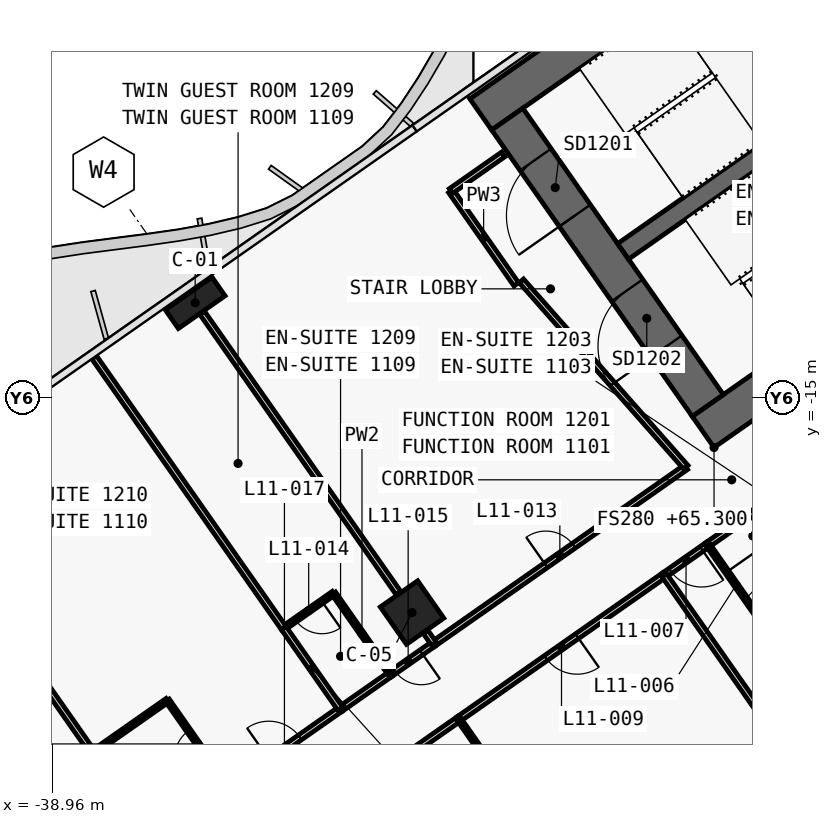
"""IFC4 building model, lengths in metres.
Left out: names, types, materials, properties, quantities, classifications, styles, units other than length and angle.
Written with IfcOpenShell. Run it as: python <this file> out.ifc"""

import sys

from ifc_helpers import new_model, si_unit, direction, frame, frame_2d, origin, origin_2d, place, context, subcontext, project, spatial, polyline, rectangle, outline, extrude, element, fill, save


model = new_model("IFC4")
c1 = context("Model", 3, precision=1e-05, world=origin(), true_north=direction((0.0, 1.0)))
c2 = subcontext(c1, "Body", "Model", "MODEL_VIEW")
j1 = project(units=[si_unit("LENGTHUNIT", "METRE"), si_unit("PLANEANGLEUNIT", "RADIAN")], contexts=[c1])
p1 = place(None, origin())
s1 = spatial("IfcSite", under=j1, at=p1, CompositionType="ELEMENT")
p2 = place(p1, origin())
s2 = spatial("IfcBuilding", under=s1, at=p2, CompositionType="ELEMENT")
p3 = place(p2, frame((0.0, 0.0, 65.3)))
s3 = spatial("IfcBuildingStorey", under=s2, at=p3, CompositionType="ELEMENT", Elevation=65.3)
p4 = place(p3, frame((0.037, 11.867, 0.0), z_axis=(0.0, 0.0, 1.0), x_axis=(-0.819155306259, -0.573571777746, 0.0)))
e1 = element("IfcWall", 1, at=p4, inside=s3, PredefinedType="SHEAR", context=c2, shape_type="SweptSolid", body=[
    extrude(outline(polyline([(33.837, 0.5), (0.7, 0.5), (0.0, -0.5), (33.837, -0.5), (33.837, 0.5)])), origin(), (0.0, 0.0, 1.0), 3.6),
])
p5 = place(p3, frame((0.037, -0.585, 0.0), z_axis=(0.0, 0.0, 1.0), x_axis=(-0.819157152511, -0.573569140985, 0.0)))
e2 = element("IfcWall", 2, at=p5, inside=s3, PredefinedType="SHEAR", context=c2, shape_type="SweptSolid", body=[
    extrude(outline(polyline([(26.695, 0.5), (0.7, 0.5), (0.0, -0.5), (26.695, -0.5), (26.695, 0.5)])), origin(), (0.0, 0.0, 1.0), 3.6),
])
p6 = place(p5, frame((2.995, 0.0, 0.0)))
e3 = element("IfcOpeningElement", 3, at=p6, cuts=e2, PredefinedType="OPENING", context=c2, shape_type="SweptSolid", body=[
    extrude(rectangle(XDim=2.4, YDim=2.1, at=frame_2d((1.2, 1.05))), frame((0.0, 0.51, 0.0), z_axis=(0.0, -1.0, 0.0), x_axis=(1.0, 0.0, 0.0)), (0.0, 0.0, 1.0), 1.02),
])
p7 = place(p5, frame((11.995, 0.0, 0.0)))
e4 = element("IfcOpeningElement", 4, at=p7, cuts=e2, PredefinedType="OPENING", context=c2, shape_type="SweptSolid", body=[
    extrude(rectangle(XDim=2.4, YDim=2.1, at=frame_2d((1.2, 1.05))), frame((0.0, 0.51, 0.0), z_axis=(0.0, -1.0, 0.0), x_axis=(1.0, 0.0, 0.0)), (0.0, 0.0, 1.0), 1.02),
])
p8 = place(p3, frame((-21.708, -15.2, 0.0), z_axis=(0.0, 0.0, 1.0), x_axis=(-0.573576324356, 0.819152122709, 0.0)))
e5 = element("IfcWall", 5, at=p8, inside=s3, PredefinedType="SHEAR", context=c2, shape_type="SweptSolid", body=[
    extrude(outline(polyline([(0.0, 0.5), (0.0, -0.5), (9.2, -0.5), (9.2, 0.5), (0.0, 0.5)])), origin(), (0.0, 0.0, 1.0), 3.6),
])
p9 = place(p8, frame((6.1, 0.0, 0.0)))
e6 = element("IfcOpeningElement", 6, at=p9, cuts=e5, PredefinedType="OPENING", context=c2, shape_type="SweptSolid", body=[
    extrude(rectangle(XDim=1.8, YDim=2.1, at=frame_2d((0.9, 1.05))), frame((0.0, 0.51, 0.0), z_axis=(0.0, -1.0, 0.0), x_axis=(1.0, 0.0, 0.0)), (0.0, 0.0, 1.0), 1.02),
])
p10 = place(p8, frame((1.9, 0.0, 0.0)))
e7 = element("IfcOpeningElement", 7, at=p10, cuts=e5, PredefinedType="OPENING", context=c2, shape_type="SweptSolid", body=[
    extrude(rectangle(XDim=1.8, YDim=2.1, at=frame_2d((0.9, 1.05))), frame((0.0, 0.51, 0.0), z_axis=(0.0, -1.0, 0.0), x_axis=(1.0, 0.0, 0.0)), (0.0, 0.0, 1.0), 1.02),
])
p11 = place(p3, frame((-2.638, 3.768, 0.0), z_axis=(0.0, 0.0, 1.0), x_axis=(-0.819148977158, -0.573580816643, 0.0)))
e8 = element("IfcWall", 8, at=p11, inside=s3, PredefinedType="SHEAR", context=c2, shape_type="SweptSolid", body=[
    extrude(outline(polyline([(26.0, 0.25), (0.0, 0.25), (0.0, -0.25), (26.0, -0.25), (26.0, 0.25)])), origin(), (0.0, 0.0, 1.0), 3.6),
])
p12 = place(p11, frame((1.169, 0.0, 0.0)))
e9 = element("IfcOpeningElement", 9, at=p12, cuts=e8, PredefinedType="OPENING", context=c2, shape_type="SweptSolid", body=[
    extrude(rectangle(XDim=1.1, YDim=2.1, at=frame_2d((0.55, 1.05))), frame((0.0, 0.26, 0.0), z_axis=(0.0, -1.0, 0.0), x_axis=(1.0, 0.0, 0.0)), (0.0, 0.0, 1.0), 0.52),
])
p13 = place(p11, frame((3.206, 0.0, 0.0)))
e10 = element("IfcOpeningElement", 10, at=p13, cuts=e8, PredefinedType="OPENING", context=c2, shape_type="SweptSolid", body=[
    extrude(rectangle(XDim=1.1, YDim=2.1, at=frame_2d((0.55, 1.05))), frame((0.0, 0.26, 0.0), z_axis=(0.0, -1.0, 0.0), x_axis=(1.0, 0.0, 0.0)), (0.0, 0.0, 1.0), 0.52),
])
p14 = place(p11, frame((5.244, 0.0, 0.0)))
e11 = element("IfcOpeningElement", 11, at=p14, cuts=e8, PredefinedType="OPENING", context=c2, shape_type="SweptSolid", body=[
    extrude(rectangle(XDim=1.1, YDim=2.1, at=frame_2d((0.55, 1.05))), frame((0.0, 0.26, 0.0), z_axis=(0.0, -1.0, 0.0), x_axis=(1.0, 0.0, 0.0)), (0.0, 0.0, 1.0), 0.52),
])
p15 = place(p11, frame((7.281, 0.0, 0.0)))
e12 = element("IfcOpeningElement", 12, at=p15, cuts=e8, PredefinedType="OPENING", context=c2, shape_type="SweptSolid", body=[
    extrude(rectangle(XDim=1.1, YDim=2.1, at=frame_2d((0.55, 1.05))), frame((0.0, 0.26, 0.0), z_axis=(0.0, -1.0, 0.0), x_axis=(1.0, 0.0, 0.0)), (0.0, 0.0, 1.0), 0.52),
])
p16 = place(p11, frame((9.688, 0.0, 0.0)))
e13 = element("IfcOpeningElement", 13, at=p16, cuts=e8, PredefinedType="OPENING", context=c2, shape_type="SweptSolid", body=[
    extrude(rectangle(XDim=1.1, YDim=2.1, at=frame_2d((0.55, 1.05))), frame((0.0, 0.26, 0.0), z_axis=(0.0, -1.0, 0.0), x_axis=(1.0, 0.0, 0.0)), (0.0, 0.0, 1.0), 0.52),
])
p17 = place(p11, frame((11.863, 0.0, 0.0)))
e14 = element("IfcOpeningElement", 14, at=p17, cuts=e8, PredefinedType="OPENING", context=c2, shape_type="SweptSolid", body=[
    extrude(rectangle(XDim=1.1, YDim=2.1, at=frame_2d((0.55, 1.05))), frame((0.0, 0.26, 0.0), z_axis=(0.0, -1.0, 0.0), x_axis=(1.0, 0.0, 0.0)), (0.0, 0.0, 1.0), 0.52),
])
p18 = place(p11, frame((14.038, 0.0, 0.0)))
e15 = element("IfcOpeningElement", 15, at=p18, cuts=e8, PredefinedType="OPENING", context=c2, shape_type="SweptSolid", body=[
    extrude(rectangle(XDim=1.1, YDim=2.1, at=frame_2d((0.55, 1.05))), frame((0.0, 0.26, 0.0), z_axis=(0.0, -1.0, 0.0), x_axis=(1.0, 0.0, 0.0)), (0.0, 0.0, 1.0), 0.52),
])
p19 = place(p11, frame((16.212, 0.0, 0.0)))
e16 = element("IfcOpeningElement", 16, at=p19, cuts=e8, PredefinedType="OPENING", context=c2, shape_type="SweptSolid", body=[
    extrude(rectangle(XDim=1.1, YDim=2.1, at=frame_2d((0.55, 1.05))), frame((0.0, 0.26, 0.0), z_axis=(0.0, -1.0, 0.0), x_axis=(1.0, 0.0, 0.0)), (0.0, 0.0, 1.0), 0.52),
])
p20 = place(p3, frame((-35.197, -12.498, 0.0), z_axis=(0.0, 0.0, 1.0), x_axis=(-0.819152044289, -0.573576436351, 0.0)))
e17 = element("IfcColumn", 17, at=p20, inside=s3, PredefinedType="COLUMN", context=c2, shape_type="SweptSolid", body=[
    extrude(rectangle(XDim=1.5, YDim=0.6, at=origin_2d()), origin(), (0.0, 0.0, 1.0), 3.6),
])
p21 = place(p3, frame((-29.49, -20.649, 0.0), z_axis=(0.0, 0.0, 1.0), x_axis=(-0.819152044289, -0.573576436351, 0.0)))
e18 = element("IfcColumn", 18, at=p21, inside=s3, PredefinedType="COLUMN", context=c2, shape_type="SweptSolid", body=[
    extrude(rectangle(XDim=1.2, YDim=1.2, at=origin_2d()), origin(), (0.0, 0.0, 1.0), 3.6),
])
p22 = place(p3, frame((-28.917, -21.469, 0.0), z_axis=(0.0, 0.0, 1.0), x_axis=(0.819152599934, 0.573575642807, 0.0)))
e19 = element("IfcWall", 19, at=p22, inside=s3, PredefinedType="PARTITIONING", context=c2, shape_type="SweptSolid", body=[
    extrude(rectangle(XDim=8.098, YDim=0.15, at=frame_2d((4.049, 0.0))), origin(), (0.0, 0.0, 1.0), 2.6),
])
p23 = place(p22, frame((3.599, 0.0, 0.0)))
e20 = element("IfcOpeningElement", 20, at=p23, cuts=e19, PredefinedType="OPENING", context=c2, shape_type="SweptSolid", body=[
    extrude(rectangle(XDim=0.9, YDim=2.1, at=frame_2d((0.45, 1.05))), frame((0.0, 0.085, 0.0), z_axis=(0.0, -1.0, 0.0), x_axis=(1.0, 0.0, 0.0)), (0.0, 0.0, 1.0), 0.17),
])
p24 = place(p3, frame((-28.914, -21.467, 0.0), z_axis=(0.0, 0.0, 1.0), x_axis=(-0.81914197737, -0.573590813132, 0.0)))
e21 = element("IfcWall", 21, at=p24, inside=s3, PredefinedType="PARTITIONING", context=c2, shape_type="SweptSolid", body=[
    extrude(rectangle(XDim=1.403, YDim=0.15, at=frame_2d((0.701, 0.0))), origin(), (0.0, 0.0, 1.0), 2.6),
])
p25 = place(p24, frame((0.403, 0.0, 0.0)))
e22 = element("IfcOpeningElement", 22, at=p25, cuts=e21, PredefinedType="OPENING", context=c2, shape_type="SweptSolid", body=[
    extrude(rectangle(XDim=0.85, YDim=2.1, at=frame_2d((0.425, 1.05))), frame((0.0, 0.085, 0.0), z_axis=(0.0, -1.0, 0.0), x_axis=(1.0, 0.0, 0.0)), (0.0, 0.0, 1.0), 0.17),
])
p26 = place(p3, frame((-31.375, -23.19, 0.0), z_axis=(0.0, 0.0, 1.0), x_axis=(0.819189013667, 0.573523634986, 0.0)))
e23 = element("IfcWall", 23, at=p26, inside=s3, PredefinedType="PARTITIONING", context=c2, shape_type="SweptSolid", body=[
    extrude(rectangle(XDim=1.604, YDim=0.15, at=frame_2d((0.802, 0.0))), origin(), (0.0, 0.0, 1.0), 3.32),
])
p27 = place(p3, frame((-34.323, -25.254, 0.0), z_axis=(0.0, 0.0, 1.0), x_axis=(0.819145961204, 0.573585123798, 0.0)))
e24 = element("IfcWall", 24, at=p27, inside=s3, PredefinedType="PARTITIONING", context=c2, shape_type="SweptSolid", body=[
    extrude(rectangle(XDim=3.603, YDim=0.15, at=frame_2d((1.802, 0.0))), origin(), (0.0, 0.0, 1.0), 3.32),
])
p28 = place(p27, frame((1.301, 0.0, 0.0)))
e25 = element("IfcOpeningElement", 25, at=p28, cuts=e24, PredefinedType="OPENING", context=c2, shape_type="SweptSolid", body=[
    extrude(rectangle(XDim=1.0, YDim=2.1, at=frame_2d((0.5, 1.05))), frame((0.0, 0.085, 0.0), z_axis=(0.0, -1.0, 0.0), x_axis=(1.0, 0.0, 0.0)), (0.0, 0.0, 1.0), 0.17),
])
p29 = place(p3, frame((-21.706, -18.861, 0.0), z_axis=(0.0, 0.0, 1.0), x_axis=(-0.819060210533, -0.573707566205, 0.0)))
e26 = element("IfcWall", 26, at=p29, inside=s3, PredefinedType="PARTITIONING", context=c2, shape_type="SweptSolid", body=[
    extrude(rectangle(XDim=1.403, YDim=0.15, at=frame_2d((0.702, 0.0))), origin(), (0.0, 0.0, 1.0), 3.32),
])
p30 = place(p29, frame((0.201, 0.0, 0.0)))
e27 = element("IfcOpeningElement", 27, at=p30, cuts=e26, PredefinedType="OPENING", context=c2, shape_type="SweptSolid", body=[
    extrude(rectangle(XDim=1.0, YDim=2.1, at=frame_2d((0.5, 1.05))), frame((0.0, 0.085, 0.0), z_axis=(0.0, -1.0, 0.0), x_axis=(1.0, 0.0, 0.0)), (0.0, 0.0, 1.0), 0.17),
])
p31 = place(p3, frame((-20.395, -17.943, 0.0), z_axis=(0.0, 0.0, 1.0), x_axis=(-0.819189013667, -0.573523634986, 0.0)))
e28 = element("IfcWall", 28, at=p31, inside=s3, PredefinedType="PARTITIONING", context=c2, shape_type="SweptSolid", body=[
    extrude(rectangle(XDim=1.604, YDim=0.15, at=frame_2d((0.802, 0.0))), origin(), (0.0, 0.0, 1.0), 2.6),
])
p32 = place(p3, frame((-22.852, -19.664, 0.0), z_axis=(0.0, 0.0, 1.0), x_axis=(-0.819141582452, -0.573591377113, 0.0)))
e29 = element("IfcWall", 29, at=p32, inside=s3, PredefinedType="PARTITIONING", context=c2, shape_type="SweptSolid", body=[
    extrude(rectangle(XDim=6.603, YDim=0.15, at=frame_2d((3.301, 0.0))), origin(), (0.0, 0.0, 1.0), 2.6),
])
p33 = place(p32, frame((2.802, 0.0, 0.0)))
e30 = element("IfcOpeningElement", 30, at=p33, cuts=e29, PredefinedType="OPENING", context=c2, shape_type="SweptSolid", body=[
    extrude(rectangle(XDim=1.0, YDim=2.1, at=frame_2d((0.5, 1.05))), frame((0.0, 0.085, 0.0), z_axis=(0.0, -1.0, 0.0), x_axis=(1.0, 0.0, 0.0)), (0.0, 0.0, 1.0), 0.17),
])
p34 = place(p3, frame((-28.259, -23.449, 0.0), z_axis=(0.0, 0.0, 1.0), x_axis=(-0.819146032251, -0.573585022335, 0.0)))
e31 = element("IfcWall", 31, at=p34, inside=s3, PredefinedType="PARTITIONING", context=c2, shape_type="SweptSolid", body=[
    extrude(rectangle(XDim=2.404, YDim=0.15, at=frame_2d((1.202, 0.0))), origin(), (0.0, 0.0, 1.0), 3.32),
])
p35 = place(p3, frame((-26.746, -12.014, 0.0), z_axis=(0.0, 0.0, 1.0), x_axis=(-0.573560650686, 0.819163097304, 0.0)))
e32 = element("IfcWall", 32, at=p35, inside=s3, PredefinedType="PARTITIONING", context=c2, shape_type="SweptSolid", body=[
    extrude(rectangle(XDim=3.0, YDim=0.15, at=frame_2d((1.5, 0.0))), origin(), (0.0, 0.0, 1.0), 3.32),
])
p36 = place(p3, frame((-28.467, -9.556, 0.0), z_axis=(0.0, 0.0, 1.0), x_axis=(0.819109000826, 0.573637903879, 0.0)))
e33 = element("IfcWall", 33, at=p36, inside=s3, PredefinedType="PARTITIONING", context=c2, shape_type="SweptSolid", body=[
    extrude(rectangle(XDim=1.68, YDim=0.15, at=frame_2d((0.84, 0.0))), origin(), (0.0, 0.0, 1.0), 3.32),
])
p37 = place(p3, frame((-22.284, -16.827, 0.0), z_axis=(0.0, 0.0, 1.0), x_axis=(-0.661545117561, 0.749905365651, 0.0)))
e34 = element("IfcWall", 34, at=p37, inside=s3, PredefinedType="PARTITIONING", context=c2, shape_type="SweptSolid", body=[
    extrude(rectangle(XDim=6.543, YDim=0.15, at=frame_2d((3.271, 0.0))), origin(), (0.0, 0.0, 1.0), 2.6),
])
p38 = place(p3, frame((-28.916, -21.468, 0.0), z_axis=(0.0, 0.0, 1.0), x_axis=(-0.572944929411, 0.819593867633, 0.0)))
e35 = element("IfcWall", 35, at=p38, inside=s3, PredefinedType="PARTITIONING", context=c2, shape_type="SweptSolid", body=[
    extrude(rectangle(XDim=0.38, YDim=0.15, at=frame_2d((0.19, 0.0))), origin(), (0.0, 0.0, 1.0), 2.6),
])
p39 = place(p3, frame((-29.845, -20.141, 0.0), z_axis=(0.0, 0.0, 1.0), x_axis=(-0.573558725113, 0.819164445546, 0.0)))
e36 = element("IfcWall", 36, at=p39, inside=s3, PredefinedType="PARTITIONING", context=c2, shape_type="SweptSolid", body=[
    extrude(rectangle(XDim=9.01, YDim=0.15, at=frame_2d((4.505, 0.0))), origin(), (0.0, 0.0, 1.0), 2.6),
])
p40 = place(p3, frame((-30.062, -22.27, 0.0), z_axis=(0.0, 0.0, 1.0), x_axis=(-0.573537965655, 0.819178980414, 0.0)))
e37 = element("IfcWall", 37, at=p40, inside=s3, PredefinedType="PARTITIONING", context=c2, shape_type="SweptSolid", body=[
    extrude(rectangle(XDim=2.6, YDim=0.12, at=frame_2d((1.3, 0.0))), origin(), (0.0, 0.0, 1.0), 2.6),
])
p41 = place(p3, frame((-31.555, -20.14, 0.0), z_axis=(0.0, 0.0, 1.0), x_axis=(-0.819131543282, -0.57360571371, 0.0)))
e38 = element("IfcWall", 38, at=p41, inside=s3, PredefinedType="PARTITIONING", context=c2, shape_type="SweptSolid", body=[
    extrude(rectangle(XDim=1.6, YDim=0.12, at=frame_2d((0.8, 0.0))), origin(), (0.0, 0.0, 1.0), 3.32),
])
p42 = place(p41, frame((0.375, 0.0, 0.0)))
e39 = element("IfcOpeningElement", 39, at=p42, cuts=e38, PredefinedType="OPENING", context=c2, shape_type="SweptSolid", body=[
    extrude(rectangle(XDim=0.85, YDim=2.05, at=frame_2d((0.425, 1.025))), frame((0.0, 0.07, 0.0), z_axis=(0.0, -1.0, 0.0), x_axis=(1.0, 0.0, 0.0)), (0.0, 0.0, 1.0), 0.14),
])
p43 = place(p3, frame((-32.865, -21.058, 0.0), z_axis=(0.0, 0.0, 1.0), x_axis=(-0.573564051961, 0.819160715792, 0.0)))
e40 = element("IfcWall", 40, at=p43, inside=s3, PredefinedType="PARTITIONING", context=c2, shape_type="SweptSolid", body=[
    extrude(rectangle(XDim=8.699, YDim=0.15, at=frame_2d((4.35, 0.0))), origin(), (0.0, 0.0, 1.0), 2.5),
])
p44 = place(p3, frame((-31.373, -23.189, 0.0), z_axis=(0.0, 0.0, 1.0), x_axis=(-0.573600972199, 0.819134863556, 0.0)))
e41 = element("IfcWall", 41, at=p44, inside=s3, PredefinedType="PARTITIONING", context=c2, shape_type="SweptSolid", body=[
    extrude(rectangle(XDim=2.6, YDim=0.15, at=frame_2d((1.3, 0.0))), origin(), (0.0, 0.0, 1.0), 2.6),
])
p45 = place(p3, frame((-34.322, -25.253, 0.0), z_axis=(0.0, 0.0, 1.0), x_axis=(-0.573550118428, 0.819170471667, 0.0)))
e42 = element("IfcWall", 42, at=p45, inside=s3, PredefinedType="PARTITIONING", context=c2, shape_type="SweptSolid", body=[
    extrude(rectangle(XDim=2.8, YDim=0.12, at=frame_2d((1.4, 0.0))), origin(), (0.0, 0.0, 1.0), 2.6),
])
p46 = place(p45, frame((0.975, 0.0, 0.0)))
e43 = element("IfcOpeningElement", 43, at=p46, cuts=e42, PredefinedType="OPENING", context=c2, shape_type="SweptSolid", body=[
    extrude(rectangle(XDim=0.85, YDim=2.05, at=frame_2d((0.425, 1.025))), frame((0.0, 0.07, 0.0), z_axis=(0.0, -1.0, 0.0), x_axis=(1.0, 0.0, 0.0)), (0.0, 0.0, 1.0), 0.14),
])
p47 = place(p3, frame((-35.929, -22.959, 0.0), z_axis=(0.0, 0.0, 1.0), x_axis=(-0.819141114317, -0.573592045652, 0.0)))
e44 = element("IfcWall", 44, at=p47, inside=s3, PredefinedType="PARTITIONING", context=c2, shape_type="SweptSolid", body=[
    extrude(rectangle(XDim=2.4, YDim=0.12, at=frame_2d((1.2, 0.0))), origin(), (0.0, 0.0, 1.0), 3.32),
])
p48 = place(p3, frame((-37.895, -24.336, 0.0), z_axis=(0.0, 0.0, 1.0), x_axis=(-0.573530875885, 0.819183944183, 0.0)))
e45 = element("IfcWall", 45, at=p48, inside=s3, PredefinedType="PARTITIONING", context=c2, shape_type="SweptSolid", body=[
    extrude(rectangle(XDim=5.499, YDim=0.15, at=frame_2d((2.75, 0.0))), origin(), (0.0, 0.0, 1.0), 3.32),
])
p49 = place(p3, frame((-21.708, -18.862, 0.0), z_axis=(0.0, 0.0, 1.0), x_axis=(0.573537965655, -0.819178980414, 0.0)))
e46 = element("IfcWall", 46, at=p49, inside=s3, PredefinedType="PARTITIONING", context=c2, shape_type="SweptSolid", body=[
    extrude(rectangle(XDim=2.6, YDim=0.12, at=frame_2d((1.3, 0.0))), origin(), (0.0, 0.0, 1.0), 3.32),
])
p50 = place(p49, frame((0.875, 0.0, 0.0)))
e47 = element("IfcOpeningElement", 47, at=p50, cuts=e46, PredefinedType="OPENING", context=c2, shape_type="SweptSolid", body=[
    extrude(rectangle(XDim=0.85, YDim=2.05, at=frame_2d((0.425, 1.025))), frame((0.0, 0.07, 0.0), z_axis=(0.0, -1.0, 0.0), x_axis=(1.0, 0.0, 0.0)), (0.0, 0.0, 1.0), 0.14),
])
p51 = place(p3, frame((-18.667, -25.645, 0.0), z_axis=(0.0, 0.0, 1.0), x_axis=(-0.573572324301, 0.819154923562, 0.0)))
e48 = element("IfcWall", 48, at=p51, inside=s3, PredefinedType="PARTITIONING", context=c2, shape_type="SweptSolid", body=[
    extrude(rectangle(XDim=7.3, YDim=0.15, at=frame_2d((3.65, 0.0))), origin(), (0.0, 0.0, 1.0), 2.5),
])
p52 = place(p3, frame((-26.653, -25.743, 0.0), z_axis=(0.0, 0.0, 1.0), x_axis=(-0.573608623498, 0.819129505664, 0.0)))
e49 = element("IfcWall", 49, at=p52, inside=s3, PredefinedType="PARTITIONING", context=c2, shape_type="SweptSolid", body=[
    extrude(rectangle(XDim=2.8, YDim=0.12, at=frame_2d((1.4, 0.0))), origin(), (0.0, 0.0, 1.0), 3.32),
])
p53 = place(p52, frame((0.975, 0.0, 0.0)))
e50 = element("IfcOpeningElement", 50, at=p53, cuts=e49, PredefinedType="OPENING", context=c2, shape_type="SweptSolid", body=[
    extrude(rectangle(XDim=0.85, YDim=2.05, at=frame_2d((0.425, 1.025))), frame((0.0, 0.07, 0.0), z_axis=(0.0, -1.0, 0.0), x_axis=(1.0, 0.0, 0.0)), (0.0, 0.0, 1.0), 0.14),
])
p54 = place(p9, origin())
e51 = element("IfcDoor", 51, at=p54, inside=s3, OperationType="DOUBLE_DOOR_SINGLE_SWING", PredefinedType="DOOR", context=c2, shape_type="SweptSolid", body=[
    extrude(rectangle(XDim=1.8, YDim=2.1, at=frame_2d((0.9, 1.05))), frame((0.0, 0.025, 0.0), z_axis=(0.0, -1.0, 0.0), x_axis=(1.0, 0.0, 0.0)), (0.0, 0.0, 1.0), 0.05),
])
fill(e6, e51)
p55 = place(p10, origin())
e52 = element("IfcDoor", 52, at=p55, inside=s3, OperationType="DOUBLE_DOOR_SINGLE_SWING", PredefinedType="DOOR", context=c2, shape_type="SweptSolid", body=[
    extrude(rectangle(XDim=1.8, YDim=2.1, at=frame_2d((0.9, 1.05))), frame((0.0, 0.025, 0.0), z_axis=(0.0, -1.0, 0.0), x_axis=(1.0, 0.0, 0.0)), (0.0, 0.0, 1.0), 0.05),
])
fill(e7, e52)
p56 = place(p50, origin())
e53 = element("IfcDoor", 53, at=p56, inside=s3, OperationType="SINGLE_SWING_LEFT", PredefinedType="DOOR", context=c2, shape_type="SweptSolid", body=[
    extrude(rectangle(XDim=0.85, YDim=2.05, at=frame_2d((0.425, 1.025))), frame((0.0, 0.025, 0.0), z_axis=(0.0, -1.0, 0.0), x_axis=(1.0, 0.0, 0.0)), (0.0, 0.0, 1.0), 0.05),
])
fill(e47, e53)
p57 = place(p30, origin())
e54 = element("IfcDoor", 54, at=p57, inside=s3, OperationType="SINGLE_SWING_RIGHT", PredefinedType="DOOR", context=c2, shape_type="SweptSolid", body=[
    extrude(rectangle(XDim=1.0, YDim=2.1, at=frame_2d((0.5, 1.05))), frame((0.0, 0.025, 0.0), z_axis=(0.0, -1.0, 0.0), x_axis=(1.0, 0.0, 0.0)), (0.0, 0.0, 1.0), 0.05),
])
fill(e27, e54)
p58 = place(p33, origin())
e55 = element("IfcDoor", 55, at=p58, inside=s3, OperationType="SINGLE_SWING_RIGHT", PredefinedType="DOOR", context=c2, shape_type="SweptSolid", body=[
    extrude(rectangle(XDim=1.0, YDim=2.1, at=frame_2d((0.5, 1.05))), frame((0.0, 0.025, 0.0), z_axis=(0.0, -1.0, 0.0), x_axis=(1.0, 0.0, 0.0)), (0.0, 0.0, 1.0), 0.05),
])
fill(e30, e55)
p59 = place(p23, origin())
e56 = element("IfcDoor", 56, at=p59, inside=s3, OperationType="SINGLE_SWING_LEFT", PredefinedType="DOOR", context=c2, shape_type="SweptSolid", body=[
    extrude(rectangle(XDim=0.9, YDim=2.1, at=frame_2d((0.45, 1.05))), frame((0.0, 0.025, 0.0), z_axis=(0.0, -1.0, 0.0), x_axis=(1.0, 0.0, 0.0)), (0.0, 0.0, 1.0), 0.05),
])
fill(e20, e56)
p60 = place(p42, origin())
e57 = element("IfcDoor", 57, at=p60, inside=s3, OperationType="SINGLE_SWING_RIGHT", PredefinedType="DOOR", context=c2, shape_type="SweptSolid", body=[
    extrude(rectangle(XDim=0.85, YDim=2.05, at=frame_2d((0.425, 1.025))), frame((0.0, 0.025, 0.0), z_axis=(0.0, -1.0, 0.0), x_axis=(1.0, 0.0, 0.0)), (0.0, 0.0, 1.0), 0.05),
])
fill(e39, e57)
p61 = place(p25, origin())
e58 = element("IfcDoor", 58, at=p61, inside=s3, OperationType="SINGLE_SWING_LEFT", PredefinedType="DOOR", context=c2, shape_type="SweptSolid", body=[
    extrude(rectangle(XDim=0.85, YDim=2.1, at=frame_2d((0.425, 1.05))), frame((0.0, 0.025, 0.0), z_axis=(0.0, -1.0, 0.0), x_axis=(1.0, 0.0, 0.0)), (0.0, 0.0, 1.0), 0.05),
])
fill(e22, e58)
p62 = place(p46, origin())
e59 = element("IfcDoor", 59, at=p62, inside=s3, OperationType="SINGLE_SWING_RIGHT", PredefinedType="DOOR", context=c2, shape_type="SweptSolid", body=[
    extrude(rectangle(XDim=0.85, YDim=2.05, at=frame_2d((0.425, 1.025))), frame((0.0, 0.025, 0.0), z_axis=(0.0, -1.0, 0.0), x_axis=(1.0, 0.0, 0.0)), (0.0, 0.0, 1.0), 0.05),
])
fill(e43, e59)
p63 = place(p28, origin())
e60 = element("IfcDoor", 60, at=p63, inside=s3, OperationType="SINGLE_SWING_LEFT", PredefinedType="DOOR", context=c2, shape_type="SweptSolid", body=[
    extrude(rectangle(XDim=1.0, YDim=2.1, at=frame_2d((0.5, 1.05))), frame((0.0, 0.025, 0.0), z_axis=(0.0, -1.0, 0.0), x_axis=(1.0, 0.0, 0.0)), (0.0, 0.0, 1.0), 0.05),
])
fill(e25, e60)
save(model, sys.argv[1])
